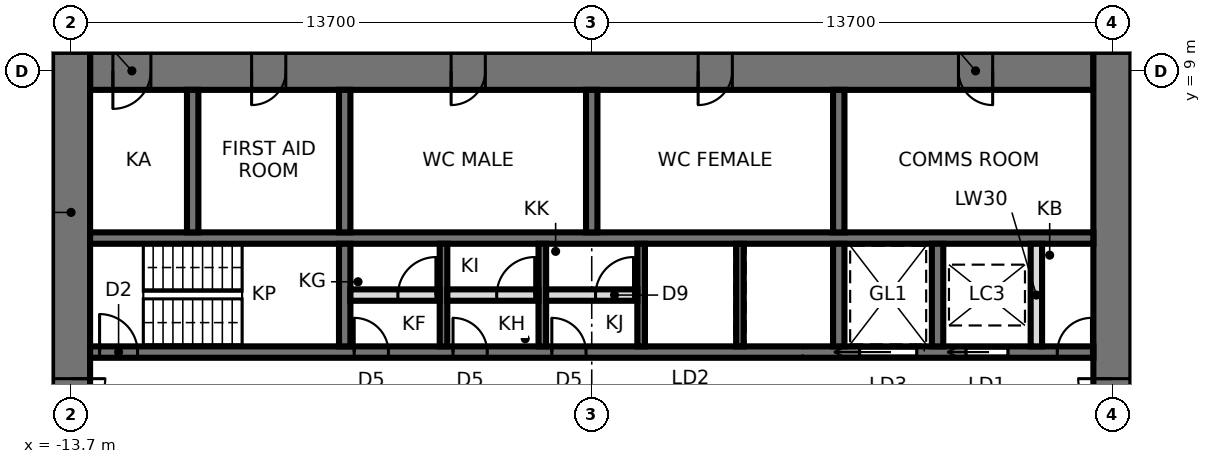
"""IFC4 building model, lengths in metres.
Left out: names, types, materials, properties, quantities, classifications, styles, units other than length and angle.
Written with IfcOpenShell. Run it as: python <this file> out.ifc"""

import sys

from ifc_helpers import new_model, si_unit, direction, frame, frame_2d, origin, place, context, subcontext, project, spatial, rectangle, extrude, element, fill, save


model = new_model("IFC4")
c1 = context("Model", 3, precision=1e-05, world=origin(), true_north=direction((0.0, 1.0)))
c2 = subcontext(c1, "Body", "Model", "MODEL_VIEW")
j1 = project(units=[si_unit("LENGTHUNIT", "METRE"), si_unit("PLANEANGLEUNIT", "RADIAN")], contexts=[c1])
p1 = place(None, origin())
s1 = spatial("IfcSite", under=j1, at=p1, CompositionType="ELEMENT")
p2 = place(p1, origin())
s2 = spatial("IfcBuilding", under=s1, at=p2, CompositionType="ELEMENT")
p3 = place(p2, frame((0.0, 0.0, 226.7)))
s3 = spatial("IfcBuildingStorey", under=s2, at=p3, CompositionType="ELEMENT", Elevation=226.7)
p4 = place(p3, frame((13.2, 9.0, 0.0), z_axis=(0.0, 0.0, 1.0), x_axis=(-1.0, 0.0, 0.0)))
e1 = element("IfcWall", 1, at=p4, inside=s3, PredefinedType="SHEAR", context=c2, shape_type="SweptSolid", body=[
    extrude(rectangle(XDim=26.4, YDim=1.0, at=frame_2d((13.2, 0.0))), origin(), (0.0, 0.0, 1.0), 3.9),
])
p5 = place(p4, frame((2.65, 0.0, 0.0)))
e2 = element("IfcOpeningElement", 2, at=p5, cuts=e1, PredefinedType="OPENING", context=c2, shape_type="SweptSolid", body=[
    extrude(rectangle(XDim=0.9, YDim=2.1, at=frame_2d((0.45, 1.05))), frame((0.0, 0.51, 0.0), z_axis=(0.0, -1.0, 0.0), x_axis=(1.0, 0.0, 0.0)), (0.0, 0.0, 1.0), 1.02),
])
p6 = place(p4, frame((9.5, 0.0, 0.0)))
e3 = element("IfcOpeningElement", 3, at=p6, cuts=e1, PredefinedType="OPENING", context=c2, shape_type="SweptSolid", body=[
    extrude(rectangle(XDim=0.9, YDim=2.1, at=frame_2d((0.45, 1.05))), frame((0.0, 0.51, 0.0), z_axis=(0.0, -1.0, 0.0), x_axis=(1.0, 0.0, 0.0)), (0.0, 0.0, 1.0), 1.02),
])
p7 = place(p4, frame((16.0, 0.0, 0.0)))
e4 = element("IfcOpeningElement", 4, at=p7, cuts=e1, PredefinedType="OPENING", context=c2, shape_type="SweptSolid", body=[
    extrude(rectangle(XDim=0.9, YDim=2.1, at=frame_2d((0.45, 1.05))), frame((0.0, 0.51, 0.0), z_axis=(0.0, -1.0, 0.0), x_axis=(1.0, 0.0, 0.0)), (0.0, 0.0, 1.0), 1.02),
])
p8 = place(p4, frame((21.25, 0.0, 0.0)))
e5 = element("IfcOpeningElement", 5, at=p8, cuts=e1, PredefinedType="OPENING", context=c2, shape_type="SweptSolid", body=[
    extrude(rectangle(XDim=0.9, YDim=2.1, at=frame_2d((0.45, 1.05))), frame((0.0, 0.51, 0.0), z_axis=(0.0, -1.0, 0.0), x_axis=(1.0, 0.0, 0.0)), (0.0, 0.0, 1.0), 1.02),
])
p9 = place(p4, frame((24.8, 0.0, 0.0)))
e6 = element("IfcOpeningElement", 6, at=p9, cuts=e1, PredefinedType="OPENING", context=c2, shape_type="SweptSolid", body=[
    extrude(rectangle(XDim=1.0, YDim=2.1, at=frame_2d((0.5, 1.05))), frame((0.0, 0.51, 0.0), z_axis=(0.0, -1.0, 0.0), x_axis=(1.0, 0.0, 0.0)), (0.0, 0.0, 1.0), 1.02),
])
p10 = place(p3, frame((13.7, -9.5, 0.0), z_axis=(0.0, 0.0, 1.0), x_axis=(0.0, 1.0, 0.0)))
e7 = element("IfcWall", 7, at=p10, inside=s3, PredefinedType="SHEAR", context=c2, shape_type="SweptSolid", body=[
    extrude(rectangle(XDim=19.0, YDim=1.0, at=frame_2d((9.5, 0.0))), origin(), (0.0, 0.0, 1.0), 3.9),
])
p11 = place(p10, frame((8.6, 0.0, 0.0)))
e8 = element("IfcOpeningElement", 8, at=p11, cuts=e7, PredefinedType="OPENING", context=c2, shape_type="SweptSolid", body=[
    extrude(rectangle(XDim=1.8, YDim=2.4, at=frame_2d((0.9, 1.2))), frame((0.0, 0.51, 0.0), z_axis=(0.0, -1.0, 0.0), x_axis=(1.0, 0.0, 0.0)), (0.0, 0.0, 1.0), 1.02),
])
p12 = place(p3, frame((-13.7, 9.5, 0.0), z_axis=(0.0, 0.0, 1.0), x_axis=(0.0, -1.0, 0.0)))
e9 = element("IfcWall", 9, at=p12, inside=s3, PredefinedType="SHEAR", context=c2, shape_type="SweptSolid", body=[
    extrude(rectangle(XDim=19.0, YDim=1.0, at=frame_2d((9.5, 0.0))), origin(), (0.0, 0.0, 1.0), 3.9),
])
p13 = place(p12, frame((8.6, 0.0, 0.0)))
e10 = element("IfcOpeningElement", 10, at=p13, cuts=e9, PredefinedType="OPENING", context=c2, shape_type="SweptSolid", body=[
    extrude(rectangle(XDim=1.8, YDim=2.4, at=frame_2d((0.9, 1.2))), frame((0.0, 0.51, 0.0), z_axis=(0.0, -1.0, 0.0), x_axis=(1.0, 0.0, 0.0)), (0.0, 0.0, 1.0), 1.02),
])
p14 = place(p3, frame((-13.2, 1.6, 0.0), z_axis=(0.0, 0.0, 1.0), x_axis=(1.0, 0.0, 0.0)))
e11 = element("IfcWall", 11, at=p14, inside=s3, PredefinedType="SHEAR", context=c2, shape_type="SweptSolid", body=[
    extrude(rectangle(XDim=26.4, YDim=0.3, at=frame_2d((13.2, 0.0))), origin(), (0.0, 0.0, 1.0), 3.9),
])
p15 = place(p14, frame((0.25, 0.0, 0.0)))
e12 = element("IfcOpeningElement", 12, at=p15, cuts=e11, PredefinedType="OPENING", context=c2, shape_type="SweptSolid", body=[
    extrude(rectangle(XDim=1.0, YDim=2.1, at=frame_2d((0.5, 1.05))), frame((0.0, 0.16, 0.0), z_axis=(0.0, -1.0, 0.0), x_axis=(1.0, 0.0, 0.0)), (0.0, 0.0, 1.0), 0.32),
])
p16 = place(p14, frame((23.05, 0.0, 0.0)))
e13 = element("IfcOpeningElement", 13, at=p16, cuts=e11, PredefinedType="OPENING", context=c2, shape_type="SweptSolid", body=[
    extrude(rectangle(XDim=1.1, YDim=2.3, at=frame_2d((0.55, 1.15))), frame((0.0, 0.16, 0.0), z_axis=(0.0, -1.0, 0.0), x_axis=(1.0, 0.0, 0.0)), (0.0, 0.0, 1.0), 0.32),
])
p17 = place(p14, frame((20.25, 0.0, 0.0)))
e14 = element("IfcOpeningElement", 14, at=p17, cuts=e11, PredefinedType="OPENING", context=c2, shape_type="SweptSolid", body=[
    extrude(rectangle(XDim=1.5, YDim=2.4, at=frame_2d((0.75, 1.2))), frame((0.0, 0.16, 0.0), z_axis=(0.0, -1.0, 0.0), x_axis=(1.0, 0.0, 0.0)), (0.0, 0.0, 1.0), 0.32),
])
p18 = place(p14, frame((6.95, 0.0, 0.0)))
e15 = element("IfcOpeningElement", 15, at=p18, cuts=e11, PredefinedType="OPENING", context=c2, shape_type="SweptSolid", body=[
    extrude(rectangle(XDim=0.9, YDim=2.1, at=frame_2d((0.45, 1.05))), frame((0.0, 0.16, 0.0), z_axis=(0.0, -1.0, 0.0), x_axis=(1.0, 0.0, 0.0)), (0.0, 0.0, 1.0), 0.32),
])
p19 = place(p14, frame((9.55, 0.0, 0.0)))
e16 = element("IfcOpeningElement", 16, at=p19, cuts=e11, PredefinedType="OPENING", context=c2, shape_type="SweptSolid", body=[
    extrude(rectangle(XDim=0.9, YDim=2.1, at=frame_2d((0.45, 1.05))), frame((0.0, 0.16, 0.0), z_axis=(0.0, -1.0, 0.0), x_axis=(1.0, 0.0, 0.0)), (0.0, 0.0, 1.0), 0.32),
])
p20 = place(p14, frame((12.15, 0.0, 0.0)))
e17 = element("IfcOpeningElement", 17, at=p20, cuts=e11, PredefinedType="OPENING", context=c2, shape_type="SweptSolid", body=[
    extrude(rectangle(XDim=0.9, YDim=2.1, at=frame_2d((0.45, 1.05))), frame((0.0, 0.16, 0.0), z_axis=(0.0, -1.0, 0.0), x_axis=(1.0, 0.0, 0.0)), (0.0, 0.0, 1.0), 0.32),
])
p21 = place(p14, frame((25.45, 0.0, 0.0)))
e18 = element("IfcOpeningElement", 18, at=p21, cuts=e11, PredefinedType="OPENING", context=c2, shape_type="SweptSolid", body=[
    extrude(rectangle(XDim=0.9, YDim=2.1, at=frame_2d((0.45, 1.05))), frame((0.0, 0.16, 0.0), z_axis=(0.0, -1.0, 0.0), x_axis=(1.0, 0.0, 0.0)), (0.0, 0.0, 1.0), 0.32),
])
p22 = place(p3, frame((-13.2, 4.6, 0.0), z_axis=(0.0, 0.0, 1.0), x_axis=(1.0, 0.0, 0.0)))
e19 = element("IfcWall", 19, at=p22, inside=s3, PredefinedType="SHEAR", context=c2, shape_type="SweptSolid", body=[
    extrude(rectangle(XDim=26.4, YDim=0.3, at=frame_2d((13.2, 0.0))), origin(), (0.0, 0.0, 1.0), 3.9),
])
p23 = place(p3, frame((-6.5, 1.75, 0.0), z_axis=(0.0, 0.0, 1.0), x_axis=(0.0, 1.0, 0.0)))
e20 = element("IfcWall", 20, at=p23, inside=s3, PredefinedType="SHEAR", context=c2, shape_type="SweptSolid", body=[
    extrude(rectangle(XDim=2.7, YDim=0.3, at=frame_2d((1.35, 0.0))), origin(), (0.0, 0.0, 1.0), 3.9),
])
p24 = place(p3, frame((-6.5, 4.75, 0.0), z_axis=(0.0, 0.0, 1.0), x_axis=(0.0, 1.0, 0.0)))
e21 = element("IfcWall", 21, at=p24, inside=s3, PredefinedType="SHEAR", context=c2, shape_type="SweptSolid", body=[
    extrude(rectangle(XDim=3.75, YDim=0.3, at=frame_2d((1.875, 0.0))), origin(), (0.0, 0.0, 1.0), 3.9),
])
p25 = place(p3, frame((6.5, 1.75, 0.0), z_axis=(0.0, 0.0, 1.0), x_axis=(0.0, 1.0, 0.0)))
e22 = element("IfcWall", 22, at=p25, inside=s3, PredefinedType="SHEAR", context=c2, shape_type="SweptSolid", body=[
    extrude(rectangle(XDim=2.7, YDim=0.3, at=frame_2d((1.35, 0.0))), origin(), (0.0, 0.0, 1.0), 3.9),
])
p26 = place(p3, frame((6.5, 4.75, 0.0), z_axis=(0.0, 0.0, 1.0), x_axis=(0.0, 1.0, 0.0)))
e23 = element("IfcWall", 23, at=p26, inside=s3, PredefinedType="SHEAR", context=c2, shape_type="SweptSolid", body=[
    extrude(rectangle(XDim=3.75, YDim=0.3, at=frame_2d((1.875, 0.0))), origin(), (0.0, 0.0, 1.0), 3.9),
])
for number, where, z_axis, x_axis in (
    (24, (-3.9, 1.75, 0.0), (0.0, 0.0, 1.0), (0.0, 1.0, 0.0)),
    (25, (-1.3, 1.75, 0.0), (0.0, 0.0, 1.0), (0.0, 1.0, 0.0)),
    (26, (1.3, 1.75, 0.0), (0.0, 0.0, 1.0), (0.0, 1.0, 0.0)),
    (27, (3.9, 1.75, 0.0), (0.0, 0.0, 1.0), (0.0, 1.0, 0.0)),
):
    element("IfcWall", number, at=place(p3, frame(where, z_axis=z_axis, x_axis=x_axis)), inside=s3, PredefinedType="SHEAR", context=c2, shape_type="SweptSolid", body=[
        extrude(rectangle(XDim=2.7, YDim=0.2, at=frame_2d((1.35, 0.0))), origin(), (0.0, 0.0, 1.0), 3.9),
    ])
for number, where, z_axis, x_axis in (
    (28, (0.0, 4.75, 0.0), (0.0, 0.0, 1.0), (0.0, 1.0, 0.0)),
    (29, (-10.5, 4.75, 0.0), (0.0, 0.0, 1.0), (0.0, 1.0, 0.0)),
):
    element("IfcWall", number, at=place(p3, frame(where, z_axis=z_axis, x_axis=x_axis)), inside=s3, PredefinedType="SHEAR", context=c2, shape_type="SweptSolid", body=[
        extrude(rectangle(XDim=3.75, YDim=0.3, at=frame_2d((1.875, 0.0))), origin(), (0.0, 0.0, 1.0), 3.9),
    ])
p27 = place(p3, frame((9.1, 1.75, 0.0), z_axis=(0.0, 0.0, 1.0), x_axis=(0.0, 1.0, 0.0)))
e30 = element("IfcWall", 30, at=p27, inside=s3, PredefinedType="SHEAR", context=c2, shape_type="SweptSolid", body=[
    extrude(rectangle(XDim=2.7, YDim=0.3, at=frame_2d((1.35, 0.0))), origin(), (0.0, 0.0, 1.0), 3.9),
])
p28 = place(p3, frame((-6.35, 3.1, 0.0), z_axis=(0.0, 0.0, 1.0), x_axis=(1.0, 0.0, 0.0)))
e31 = element("IfcWall", 31, at=p28, inside=s3, PredefinedType="PARTITIONING", context=c2, shape_type="SweptSolid", body=[
    extrude(rectangle(XDim=2.35, YDim=0.3, at=frame_2d((1.175, 0.0))), origin(), (0.0, 0.0, 1.0), 3.74),
])
p29 = place(p28, frame((1.25, 0.0, 0.0)))
e32 = element("IfcOpeningElement", 32, at=p29, cuts=e31, PredefinedType="OPENING", context=c2, shape_type="SweptSolid", body=[
    extrude(rectangle(XDim=1.0, YDim=2.4, at=frame_2d((0.5, 1.2))), frame((0.0, 0.16, 0.0), z_axis=(0.0, -1.0, 0.0), x_axis=(1.0, 0.0, 0.0)), (0.0, 0.0, 1.0), 0.32),
])
p30 = place(p3, frame((-3.8, 3.1, 0.0), z_axis=(0.0, 0.0, 1.0), x_axis=(1.0, 0.0, 0.0)))
e33 = element("IfcWall", 33, at=p30, inside=s3, PredefinedType="PARTITIONING", context=c2, shape_type="SweptSolid", body=[
    extrude(rectangle(XDim=2.4, YDim=0.3, at=frame_2d((1.2, 0.0))), origin(), (0.0, 0.0, 1.0), 3.74),
])
p31 = place(p30, frame((1.3, 0.0, 0.0)))
e34 = element("IfcOpeningElement", 34, at=p31, cuts=e33, PredefinedType="OPENING", context=c2, shape_type="SweptSolid", body=[
    extrude(rectangle(XDim=1.0, YDim=2.4, at=frame_2d((0.5, 1.2))), frame((0.0, 0.16, 0.0), z_axis=(0.0, -1.0, 0.0), x_axis=(1.0, 0.0, 0.0)), (0.0, 0.0, 1.0), 0.32),
])
p32 = place(p3, frame((-1.2, 3.1, 0.0), z_axis=(0.0, 0.0, 1.0), x_axis=(1.0, 0.0, 0.0)))
e35 = element("IfcWall", 35, at=p32, inside=s3, PredefinedType="PARTITIONING", context=c2, shape_type="SweptSolid", body=[
    extrude(rectangle(XDim=2.4, YDim=0.3, at=frame_2d((1.2, 0.0))), origin(), (0.0, 0.0, 1.0), 3.74),
])
p33 = place(p32, frame((1.3, 0.0, 0.0)))
e36 = element("IfcOpeningElement", 36, at=p33, cuts=e35, PredefinedType="OPENING", context=c2, shape_type="SweptSolid", body=[
    extrude(rectangle(XDim=1.0, YDim=2.4, at=frame_2d((0.5, 1.2))), frame((0.0, 0.16, 0.0), z_axis=(0.0, -1.0, 0.0), x_axis=(1.0, 0.0, 0.0)), (0.0, 0.0, 1.0), 0.32),
])
p34 = place(p3, frame((11.7, 1.75, 0.0), z_axis=(0.0, 0.0, 1.0), x_axis=(0.0, 1.0, 0.0)))
e37 = element("IfcWall", 37, at=p34, inside=s3, PredefinedType="SOLIDWALL", context=c2, shape_type="SweptSolid", body=[
    extrude(rectangle(XDim=2.7, YDim=0.3, at=frame_2d((1.35, 0.0))), origin(), (0.0, 0.0, 1.0), 3.74),
])
p35 = place(p13, origin())
e38 = element("IfcDoor", 38, at=p35, inside=s3, OperationType="DOUBLE_DOOR_SINGLE_SWING", PredefinedType="DOOR", context=c2, shape_type="SweptSolid", body=[
    extrude(rectangle(XDim=1.72, YDim=2.36, at=frame_2d((0.9, 1.18))), frame((0.0, 0.025, 0.0), z_axis=(0.0, -1.0, 0.0), x_axis=(1.0, 0.0, 0.0)), (0.0, 0.0, 1.0), 0.05),
    extrude(rectangle(XDim=0.04, YDim=2.4, at=frame_2d((0.02, 1.2))), frame((0.0, 0.25, 0.0), z_axis=(0.0, -1.0, 0.0), x_axis=(1.0, 0.0, 0.0)), (0.0, 0.0, 1.0), 0.5),
    extrude(rectangle(XDim=0.04, YDim=2.4, at=frame_2d((1.78, 1.2))), frame((0.0, 0.25, 0.0), z_axis=(0.0, -1.0, 0.0), x_axis=(1.0, 0.0, 0.0)), (0.0, 0.0, 1.0), 0.5),
    extrude(rectangle(XDim=1.72, YDim=0.04, at=frame_2d((0.9, 2.38))), frame((0.0, 0.25, 0.0), z_axis=(0.0, -1.0, 0.0), x_axis=(1.0, 0.0, 0.0)), (0.0, 0.0, 1.0), 0.5),
])
fill(e10, e38)
p36 = place(p11, origin())
e39 = element("IfcDoor", 39, at=p36, inside=s3, OperationType="DOUBLE_DOOR_SINGLE_SWING", PredefinedType="DOOR", context=c2, shape_type="SweptSolid", body=[
    extrude(rectangle(XDim=1.72, YDim=2.36, at=frame_2d((0.9, 1.18))), frame((0.0, 0.025, 0.0), z_axis=(0.0, -1.0, 0.0), x_axis=(1.0, 0.0, 0.0)), (0.0, 0.0, 1.0), 0.05),
    extrude(rectangle(XDim=0.04, YDim=2.4, at=frame_2d((0.02, 1.2))), frame((0.0, 0.25, 0.0), z_axis=(0.0, -1.0, 0.0), x_axis=(1.0, 0.0, 0.0)), (0.0, 0.0, 1.0), 0.5),
    extrude(rectangle(XDim=0.04, YDim=2.4, at=frame_2d((1.78, 1.2))), frame((0.0, 0.25, 0.0), z_axis=(0.0, -1.0, 0.0), x_axis=(1.0, 0.0, 0.0)), (0.0, 0.0, 1.0), 0.5),
    extrude(rectangle(XDim=1.72, YDim=0.04, at=frame_2d((0.9, 2.38))), frame((0.0, 0.25, 0.0), z_axis=(0.0, -1.0, 0.0), x_axis=(1.0, 0.0, 0.0)), (0.0, 0.0, 1.0), 0.5),
])
fill(e8, e39)
p37 = place(p15, origin())
e40 = element("IfcDoor", 40, at=p37, inside=s3, OperationType="SINGLE_SWING_LEFT", PredefinedType="DOOR", context=c2, shape_type="SweptSolid", body=[
    extrude(rectangle(XDim=1.0, YDim=2.1, at=frame_2d((0.5, 1.05))), frame((0.0, 0.025, 0.0), z_axis=(0.0, -1.0, 0.0), x_axis=(1.0, 0.0, 0.0)), (0.0, 0.0, 1.0), 0.05),
])
fill(e12, e40)
p38 = place(p16, origin())
e41 = element("IfcDoor", 41, at=p38, inside=s3, OperationType="SLIDING_TO_LEFT", PredefinedType="DOOR", context=c2, shape_type="SweptSolid", body=[
    extrude(rectangle(XDim=1.1, YDim=2.3, at=frame_2d((0.55, 1.15))), frame((0.0, 0.025, 0.0), z_axis=(0.0, -1.0, 0.0), x_axis=(1.0, 0.0, 0.0)), (0.0, 0.0, 1.0), 0.05),
])
fill(e13, e41)
p39 = place(p17, origin())
e42 = element("IfcDoor", 42, at=p39, inside=s3, OperationType="SLIDING_TO_LEFT", PredefinedType="DOOR", context=c2, shape_type="SweptSolid", body=[
    extrude(rectangle(XDim=1.5, YDim=2.4, at=frame_2d((0.75, 1.2))), frame((0.0, 0.025, 0.0), z_axis=(0.0, -1.0, 0.0), x_axis=(1.0, 0.0, 0.0)), (0.0, 0.0, 1.0), 0.05),
])
fill(e14, e42)
p40 = place(p29, origin())
e43 = element("IfcDoor", 43, at=p40, inside=s3, OperationType="SINGLE_SWING_RIGHT", PredefinedType="DOOR", context=c2, shape_type="SweptSolid", body=[
    extrude(rectangle(XDim=1.0, YDim=2.4, at=frame_2d((0.5, 1.2))), frame((0.0, 0.025, 0.0), z_axis=(0.0, -1.0, 0.0), x_axis=(1.0, 0.0, 0.0)), (0.0, 0.0, 1.0), 0.05),
])
fill(e32, e43)
p41 = place(p18, origin())
e44 = element("IfcDoor", 44, at=p41, inside=s3, OperationType="SINGLE_SWING_LEFT", PredefinedType="DOOR", context=c2, shape_type="SweptSolid", body=[
    extrude(rectangle(XDim=0.9, YDim=2.1, at=frame_2d((0.45, 1.05))), frame((0.0, 0.025, 0.0), z_axis=(0.0, -1.0, 0.0), x_axis=(1.0, 0.0, 0.0)), (0.0, 0.0, 1.0), 0.05),
])
fill(e15, e44)
p42 = place(p31, origin())
e45 = element("IfcDoor", 45, at=p42, inside=s3, OperationType="SINGLE_SWING_RIGHT", PredefinedType="DOOR", context=c2, shape_type="SweptSolid", body=[
    extrude(rectangle(XDim=1.0, YDim=2.4, at=frame_2d((0.5, 1.2))), frame((0.0, 0.025, 0.0), z_axis=(0.0, -1.0, 0.0), x_axis=(1.0, 0.0, 0.0)), (0.0, 0.0, 1.0), 0.05),
])
fill(e34, e45)
p43 = place(p19, origin())
e46 = element("IfcDoor", 46, at=p43, inside=s3, OperationType="SINGLE_SWING_LEFT", PredefinedType="DOOR", context=c2, shape_type="SweptSolid", body=[
    extrude(rectangle(XDim=0.9, YDim=2.1, at=frame_2d((0.45, 1.05))), frame((0.0, 0.025, 0.0), z_axis=(0.0, -1.0, 0.0), x_axis=(1.0, 0.0, 0.0)), (0.0, 0.0, 1.0), 0.05),
])
fill(e16, e46)
p44 = place(p33, origin())
e47 = element("IfcDoor", 47, at=p44, inside=s3, OperationType="SINGLE_SWING_RIGHT", PredefinedType="DOOR", context=c2, shape_type="SweptSolid", body=[
    extrude(rectangle(XDim=1.0, YDim=2.4, at=frame_2d((0.5, 1.2))), frame((0.0, 0.025, 0.0), z_axis=(0.0, -1.0, 0.0), x_axis=(1.0, 0.0, 0.0)), (0.0, 0.0, 1.0), 0.05),
])
fill(e36, e47)
p45 = place(p20, origin())
e48 = element("IfcDoor", 48, at=p45, inside=s3, OperationType="SINGLE_SWING_LEFT", PredefinedType="DOOR", context=c2, shape_type="SweptSolid", body=[
    extrude(rectangle(XDim=0.9, YDim=2.1, at=frame_2d((0.45, 1.05))), frame((0.0, 0.025, 0.0), z_axis=(0.0, -1.0, 0.0), x_axis=(1.0, 0.0, 0.0)), (0.0, 0.0, 1.0), 0.05),
])
fill(e17, e48)
p46 = place(p21, origin())
e49 = element("IfcDoor", 49, at=p46, inside=s3, OperationType="SINGLE_SWING_RIGHT", PredefinedType="DOOR", context=c2, shape_type="SweptSolid", body=[
    extrude(rectangle(XDim=0.9, YDim=2.1, at=frame_2d((0.45, 1.05))), frame((0.0, 0.025, 0.0), z_axis=(0.0, -1.0, 0.0), x_axis=(1.0, 0.0, 0.0)), (0.0, 0.0, 1.0), 0.05),
])
fill(e18, e49)
p47 = place(p5, origin())
e50 = element("IfcDoor", 50, at=p47, inside=s3, OperationType="SINGLE_SWING_LEFT", PredefinedType="DOOR", context=c2, shape_type="SweptSolid", body=[
    extrude(rectangle(XDim=0.82, YDim=2.06, at=frame_2d((0.45, 1.03))), frame((0.0, 0.025, 0.0), z_axis=(0.0, -1.0, 0.0), x_axis=(1.0, 0.0, 0.0)), (0.0, 0.0, 1.0), 0.05),
    extrude(rectangle(XDim=0.04, YDim=2.1, at=frame_2d((0.02, 1.05))), frame((0.0, 0.25, 0.0), z_axis=(0.0, -1.0, 0.0), x_axis=(1.0, 0.0, 0.0)), (0.0, 0.0, 1.0), 0.5),
    extrude(rectangle(XDim=0.04, YDim=2.1, at=frame_2d((0.88, 1.05))), frame((0.0, 0.25, 0.0), z_axis=(0.0, -1.0, 0.0), x_axis=(1.0, 0.0, 0.0)), (0.0, 0.0, 1.0), 0.5),
    extrude(rectangle(XDim=0.82, YDim=0.04, at=frame_2d((0.45, 2.08))), frame((0.0, 0.25, 0.0), z_axis=(0.0, -1.0, 0.0), x_axis=(1.0, 0.0, 0.0)), (0.0, 0.0, 1.0), 0.5),
])
fill(e2, e50)
p48 = place(p6, origin())
e51 = element("IfcDoor", 51, at=p48, inside=s3, OperationType="SINGLE_SWING_RIGHT", PredefinedType="DOOR", context=c2, shape_type="SweptSolid", body=[
    extrude(rectangle(XDim=0.82, YDim=2.06, at=frame_2d((0.45, 1.03))), frame((0.0, 0.025, 0.0), z_axis=(0.0, -1.0, 0.0), x_axis=(1.0, 0.0, 0.0)), (0.0, 0.0, 1.0), 0.05),
    extrude(rectangle(XDim=0.04, YDim=2.1, at=frame_2d((0.02, 1.05))), frame((0.0, 0.25, 0.0), z_axis=(0.0, -1.0, 0.0), x_axis=(1.0, 0.0, 0.0)), (0.0, 0.0, 1.0), 0.5),
    extrude(rectangle(XDim=0.04, YDim=2.1, at=frame_2d((0.88, 1.05))), frame((0.0, 0.25, 0.0), z_axis=(0.0, -1.0, 0.0), x_axis=(1.0, 0.0, 0.0)), (0.0, 0.0, 1.0), 0.5),
    extrude(rectangle(XDim=0.82, YDim=0.04, at=frame_2d((0.45, 2.08))), frame((0.0, 0.25, 0.0), z_axis=(0.0, -1.0, 0.0), x_axis=(1.0, 0.0, 0.0)), (0.0, 0.0, 1.0), 0.5),
])
fill(e3, e51)
p49 = place(p7, origin())
e52 = element("IfcDoor", 52, at=p49, inside=s3, OperationType="SINGLE_SWING_RIGHT", PredefinedType="DOOR", context=c2, shape_type="SweptSolid", body=[
    extrude(rectangle(XDim=0.82, YDim=2.06, at=frame_2d((0.45, 1.03))), frame((0.0, 0.025, 0.0), z_axis=(0.0, -1.0, 0.0), x_axis=(1.0, 0.0, 0.0)), (0.0, 0.0, 1.0), 0.05),
    extrude(rectangle(XDim=0.04, YDim=2.1, at=frame_2d((0.02, 1.05))), frame((0.0, 0.25, 0.0), z_axis=(0.0, -1.0, 0.0), x_axis=(1.0, 0.0, 0.0)), (0.0, 0.0, 1.0), 0.5),
    extrude(rectangle(XDim=0.04, YDim=2.1, at=frame_2d((0.88, 1.05))), frame((0.0, 0.25, 0.0), z_axis=(0.0, -1.0, 0.0), x_axis=(1.0, 0.0, 0.0)), (0.0, 0.0, 1.0), 0.5),
    extrude(rectangle(XDim=0.82, YDim=0.04, at=frame_2d((0.45, 2.08))), frame((0.0, 0.25, 0.0), z_axis=(0.0, -1.0, 0.0), x_axis=(1.0, 0.0, 0.0)), (0.0, 0.0, 1.0), 0.5),
])
fill(e4, e52)
p50 = place(p8, origin())
e53 = element("IfcDoor", 53, at=p50, inside=s3, OperationType="SINGLE_SWING_RIGHT", PredefinedType="DOOR", context=c2, shape_type="SweptSolid", body=[
    extrude(rectangle(XDim=0.82, YDim=2.06, at=frame_2d((0.45, 1.03))), frame((0.0, 0.025, 0.0), z_axis=(0.0, -1.0, 0.0), x_axis=(1.0, 0.0, 0.0)), (0.0, 0.0, 1.0), 0.05),
    extrude(rectangle(XDim=0.04, YDim=2.1, at=frame_2d((0.02, 1.05))), frame((0.0, 0.25, 0.0), z_axis=(0.0, -1.0, 0.0), x_axis=(1.0, 0.0, 0.0)), (0.0, 0.0, 1.0), 0.5),
    extrude(rectangle(XDim=0.04, YDim=2.1, at=frame_2d((0.88, 1.05))), frame((0.0, 0.25, 0.0), z_axis=(0.0, -1.0, 0.0), x_axis=(1.0, 0.0, 0.0)), (0.0, 0.0, 1.0), 0.5),
    extrude(rectangle(XDim=0.82, YDim=0.04, at=frame_2d((0.45, 2.08))), frame((0.0, 0.25, 0.0), z_axis=(0.0, -1.0, 0.0), x_axis=(1.0, 0.0, 0.0)), (0.0, 0.0, 1.0), 0.5),
])
fill(e5, e53)
p51 = place(p9, origin())
e54 = element("IfcDoor", 54, at=p51, inside=s3, OperationType="SINGLE_SWING_RIGHT", PredefinedType="DOOR", context=c2, shape_type="SweptSolid", body=[
    extrude(rectangle(XDim=0.92, YDim=2.06, at=frame_2d((0.5, 1.03))), frame((0.0, 0.025, 0.0), z_axis=(0.0, -1.0, 0.0), x_axis=(1.0, 0.0, 0.0)), (0.0, 0.0, 1.0), 0.05),
    extrude(rectangle(XDim=0.04, YDim=2.1, at=frame_2d((0.02, 1.05))), frame((0.0, 0.25, 0.0), z_axis=(0.0, -1.0, 0.0), x_axis=(1.0, 0.0, 0.0)), (0.0, 0.0, 1.0), 0.5),
    extrude(rectangle(XDim=0.04, YDim=2.1, at=frame_2d((0.98, 1.05))), frame((0.0, 0.25, 0.0), z_axis=(0.0, -1.0, 0.0), x_axis=(1.0, 0.0, 0.0)), (0.0, 0.0, 1.0), 0.5),
    extrude(rectangle(XDim=0.92, YDim=0.04, at=frame_2d((0.5, 2.08))), frame((0.0, 0.25, 0.0), z_axis=(0.0, -1.0, 0.0), x_axis=(1.0, 0.0, 0.0)), (0.0, 0.0, 1.0), 0.5),
])
fill(e6, e54)
save(model, sys.argv[1])
